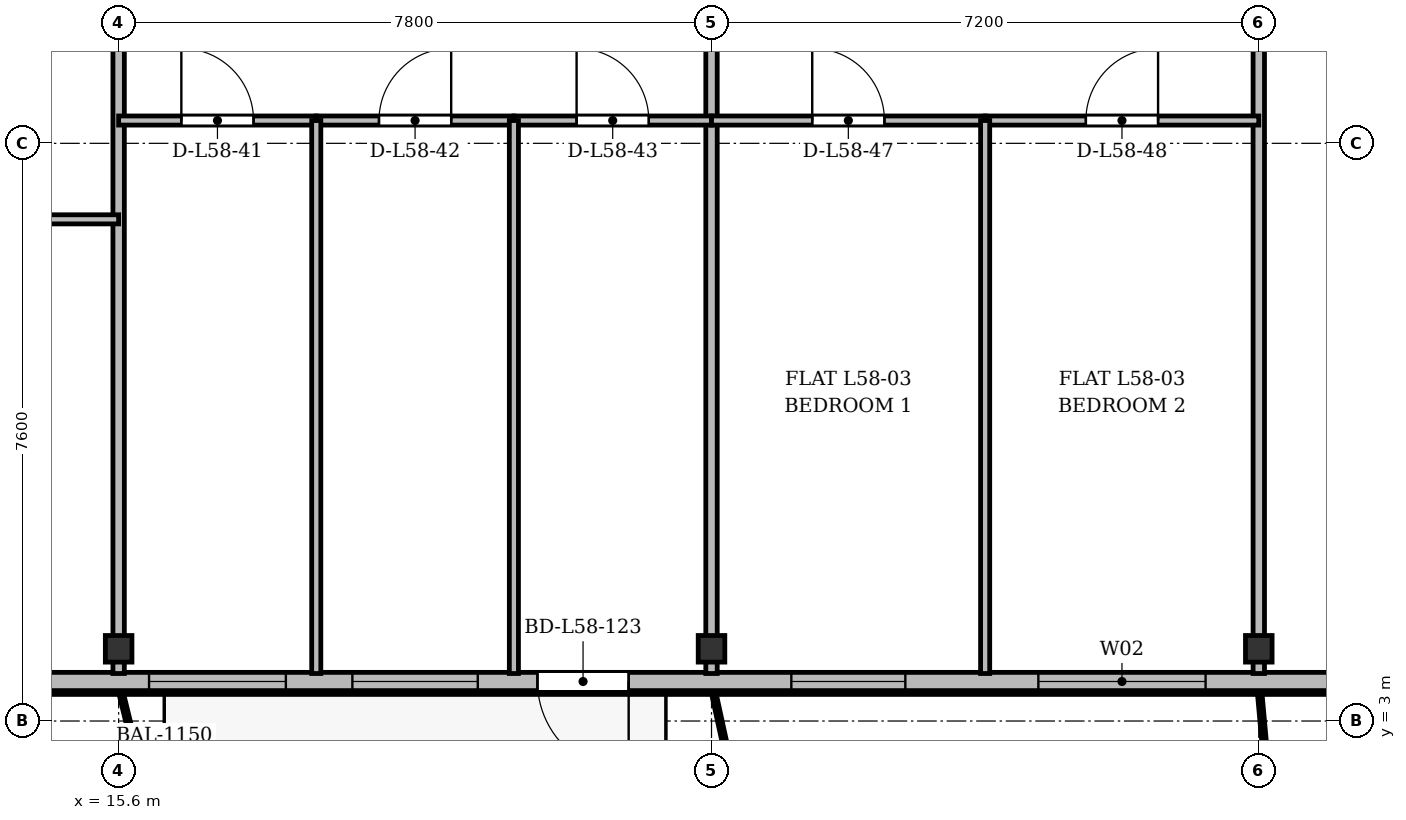
"""IFC4 building model, lengths in metres.
Left out: names, types, materials, properties, quantities, classifications, styles, units other than length and angle.
Written with IfcOpenShell. Run it as: python <this file> out.ifc"""

import sys

from ifc_helpers import new_model, si_unit, direction, frame, frame_2d, origin, origin_2d, place, context, subcontext, project, spatial, rectangle, i_section, extrude, source, transform, mapped, element, fill, save


model = new_model("IFC4")
c1 = context("Model", 3, precision=1e-05, world=origin(), true_north=direction((0.0, 1.0)))
c2 = subcontext(c1, "Body", "Model", "MODEL_VIEW")
j1 = project(units=[si_unit("LENGTHUNIT", "METRE"), si_unit("PLANEANGLEUNIT", "RADIAN")], contexts=[c1])
p1 = place(None, origin())
s1 = spatial("IfcSite", under=j1, at=p1, CompositionType="ELEMENT")
p2 = place(p1, origin())
s2 = spatial("IfcBuilding", under=s1, at=p2, CompositionType="ELEMENT")
p3 = place(p2, frame((0.0, 0.0, 222.9)))
s3 = spatial("IfcBuildingStorey", under=s2, at=p3, CompositionType="ELEMENT", Elevation=222.9)
m1 = source(origin(), c2, "Body", "SweptSolid", [
    extrude(i_section(OverallWidth=0.35, OverallDepth=0.35, WebThickness=0.018, FlangeThickness=0.028, at=origin_2d()), origin(), (0.0, 0.0, 1.0), 3.6),
])
for number, where, z_axis, x_axis in (
    (1, (15.6, 3.95, 0.0), (0.0, 0.0, 1.0), (1.0, 0.0, 0.0)),
    (2, (23.4, 3.95, 0.0), (0.0, 0.0, 1.0), (1.0, 0.0, 0.0)),
    (3, (30.6, 3.95, 0.0), (0.0, 0.0, 1.0), (1.0, 0.0, 0.0)),
):
    element("IfcColumn", number, at=place(p3, frame(where, z_axis=z_axis, x_axis=x_axis)), inside=s3, PredefinedType="COLUMN", context=c2, shape_type="MappedRepresentation", body=[
        mapped(m1, transform((0.0, 0.0, 0.0), x_axis=(1.0, 0.0, 0.0), y_axis=(0.0, 1.0, 0.0), z_axis=(0.0, 0.0, 1.0), scale=1.0)),
    ])
p4 = place(p3, frame((63.4, 3.52, 0.0), z_axis=(0.0, 0.0, 1.0), x_axis=(-1.0, 0.0, 0.0)))
e4 = element("IfcWall", 4, at=p4, inside=s3, PredefinedType="SOLIDWALL", context=c2, shape_type="SweptSolid", body=[
    extrude(rectangle(XDim=52.4, YDim=0.24, at=frame_2d((26.2, 0.0))), origin(), (0.0, 0.0, 1.0), 3.36),
])
p5 = place(p4, frame((1.345, 0.0, 0.9)))
e5 = element("IfcOpeningElement", 5, at=p5, cuts=e4, PredefinedType="OPENING", context=c2, shape_type="SweptSolid", body=[
    extrude(rectangle(XDim=2.0, YDim=1.95, at=frame_2d((1.0, 0.975))), frame((0.0, 0.13, 0.0), z_axis=(0.0, -1.0, 0.0), x_axis=(1.0, 0.0, 0.0)), (0.0, 0.0, 1.0), 0.26),
])
p6 = place(p4, frame((7.675, 0.0, 0.9)))
e6 = element("IfcOpeningElement", 6, at=p6, cuts=e4, PredefinedType="OPENING", context=c2, shape_type="SweptSolid", body=[
    extrude(rectangle(XDim=1.65, YDim=1.85, at=frame_2d((0.825, 0.925))), frame((0.0, 0.13, 0.0), z_axis=(0.0, -1.0, 0.0), x_axis=(1.0, 0.0, 0.0)), (0.0, 0.0, 1.0), 0.26),
])
p7 = place(p4, frame((13.42, 0.0, 0.0)))
e7 = element("IfcOpeningElement", 7, at=p7, cuts=e4, PredefinedType="OPENING", context=c2, shape_type="SweptSolid", body=[
    extrude(rectangle(XDim=1.2, YDim=2.2, at=frame_2d((0.6, 1.1))), frame((0.0, 0.13, 0.0), z_axis=(0.0, -1.0, 0.0), x_axis=(1.0, 0.0, 0.0)), (0.0, 0.0, 1.0), 0.26),
])
p8 = place(p4, frame((15.25, 0.0, 0.9)))
e8 = element("IfcOpeningElement", 8, at=p8, cuts=e4, PredefinedType="OPENING", context=c2, shape_type="SweptSolid", body=[
    extrude(rectangle(XDim=1.5, YDim=1.75, at=frame_2d((0.75, 0.875))), frame((0.0, 0.13, 0.0), z_axis=(0.0, -1.0, 0.0), x_axis=(1.0, 0.0, 0.0)), (0.0, 0.0, 1.0), 0.26),
])
p9 = place(p4, frame((17.65, 0.0, 0.9)))
e9 = element("IfcOpeningElement", 9, at=p9, cuts=e4, PredefinedType="OPENING", context=c2, shape_type="SweptSolid", body=[
    extrude(rectangle(XDim=1.5, YDim=1.75, at=frame_2d((0.75, 0.875))), frame((0.0, 0.13, 0.0), z_axis=(0.0, -1.0, 0.0), x_axis=(1.0, 0.0, 0.0)), (0.0, 0.0, 1.0), 0.26),
])
p10 = place(p4, frame((20.25, 0.0, 0.9)))
e10 = element("IfcOpeningElement", 10, at=p10, cuts=e4, PredefinedType="OPENING", context=c2, shape_type="SweptSolid", body=[
    extrude(rectangle(XDim=2.0, YDim=1.95, at=frame_2d((1.0, 0.975))), frame((0.0, 0.13, 0.0), z_axis=(0.0, -1.0, 0.0), x_axis=(1.0, 0.0, 0.0)), (0.0, 0.0, 1.0), 0.26),
])
p11 = place(p4, frame((23.725, 0.0, 0.9)))
e11 = element("IfcOpeningElement", 11, at=p11, cuts=e4, PredefinedType="OPENING", context=c2, shape_type="SweptSolid", body=[
    extrude(rectangle(XDim=1.65, YDim=1.85, at=frame_2d((0.825, 0.925))), frame((0.0, 0.13, 0.0), z_axis=(0.0, -1.0, 0.0), x_axis=(1.0, 0.0, 0.0)), (0.0, 0.0, 1.0), 0.26),
])
p12 = place(p4, frame((28.6, 0.0, 0.9)))
e12 = element("IfcOpeningElement", 12, at=p12, cuts=e4, PredefinedType="OPENING", context=c2, shape_type="SweptSolid", body=[
    extrude(rectangle(XDim=1.8, YDim=1.8, at=frame_2d((0.9, 0.9))), frame((0.0, 0.13, 0.0), z_axis=(0.0, -1.0, 0.0), x_axis=(1.0, 0.0, 0.0)), (0.0, 0.0, 1.0), 0.26),
])
p13 = place(p4, frame((33.5, 0.0, 0.9)))
e13 = element("IfcOpeningElement", 13, at=p13, cuts=e4, PredefinedType="OPENING", context=c2, shape_type="SweptSolid", body=[
    extrude(rectangle(XDim=2.2, YDim=1.8, at=frame_2d((1.1, 0.9))), frame((0.0, 0.13, 0.0), z_axis=(0.0, -1.0, 0.0), x_axis=(1.0, 0.0, 0.0)), (0.0, 0.0, 1.0), 0.26),
])
p14 = place(p4, frame((37.45, 0.0, 0.9)))
e14 = element("IfcOpeningElement", 14, at=p14, cuts=e4, PredefinedType="OPENING", context=c2, shape_type="SweptSolid", body=[
    extrude(rectangle(XDim=1.5, YDim=1.75, at=frame_2d((0.75, 0.875))), frame((0.0, 0.13, 0.0), z_axis=(0.0, -1.0, 0.0), x_axis=(1.0, 0.0, 0.0)), (0.0, 0.0, 1.0), 0.26),
])
p15 = place(p4, frame((41.09, 0.0, 0.0)))
e15 = element("IfcOpeningElement", 15, at=p15, cuts=e4, PredefinedType="OPENING", context=c2, shape_type="SweptSolid", body=[
    extrude(rectangle(XDim=1.2, YDim=2.2, at=frame_2d((0.6, 1.1))), frame((0.0, 0.13, 0.0), z_axis=(0.0, -1.0, 0.0), x_axis=(1.0, 0.0, 0.0)), (0.0, 0.0, 1.0), 0.26),
])
p16 = place(p4, frame((43.075, 0.0, 0.9)))
e16 = element("IfcOpeningElement", 16, at=p16, cuts=e4, PredefinedType="OPENING", context=c2, shape_type="SweptSolid", body=[
    extrude(rectangle(XDim=1.65, YDim=1.85, at=frame_2d((0.825, 0.925))), frame((0.0, 0.13, 0.0), z_axis=(0.0, -1.0, 0.0), x_axis=(1.0, 0.0, 0.0)), (0.0, 0.0, 1.0), 0.26),
])
p17 = place(p4, frame((45.6, 0.0, 0.9)))
e17 = element("IfcOpeningElement", 17, at=p17, cuts=e4, PredefinedType="OPENING", context=c2, shape_type="SweptSolid", body=[
    extrude(rectangle(XDim=1.8, YDim=1.8, at=frame_2d((0.9, 0.9))), frame((0.0, 0.13, 0.0), z_axis=(0.0, -1.0, 0.0), x_axis=(1.0, 0.0, 0.0)), (0.0, 0.0, 1.0), 0.26),
])
p18 = place(p4, frame((48.955, 0.0, 0.9)))
e18 = element("IfcOpeningElement", 18, at=p18, cuts=e4, PredefinedType="OPENING", context=c2, shape_type="SweptSolid", body=[
    extrude(rectangle(XDim=2.2, YDim=1.8, at=frame_2d((1.1, 0.9))), frame((0.0, 0.13, 0.0), z_axis=(0.0, -1.0, 0.0), x_axis=(1.0, 0.0, 0.0)), (0.0, 0.0, 1.0), 0.26),
])
for number, where, z_axis, x_axis in (
    (19, (15.6, 3.625, 0.0), (0.0, 0.0, 1.0), (0.0, 1.0, 0.0)),
    (20, (23.4, 3.625, 0.0), (0.0, 0.0, 1.0), (0.0, 1.0, 0.0)),
    (21, (30.6, 3.625, 0.0), (0.0, 0.0, 1.0), (0.0, 1.0, 0.0)),
):
    element("IfcWall", number, at=place(p3, frame(where, z_axis=z_axis, x_axis=x_axis)), inside=s3, PredefinedType="PARTITIONING", context=c2, shape_type="SweptSolid", body=[
        extrude(rectangle(XDim=27.375, YDim=0.15, at=frame_2d((13.688, 0.0))), origin(), (0.0, 0.0, 1.0), 2.86),
    ])
p19 = place(p3, frame((8.24, 9.6, 0.0), z_axis=(0.0, 0.0, 1.0), x_axis=(1.0, 0.0, 0.0)))
e22 = element("IfcWall", 22, at=p19, inside=s3, PredefinedType="PARTITIONING", context=c2, shape_type="SweptSolid", body=[
    extrude(rectangle(XDim=7.36, YDim=0.12, at=frame_2d((3.68, 0.0))), origin(), (0.0, 0.0, 1.0), 2.86),
])
p20 = place(p19, frame((3.114, 0.0, 0.0)))
e23 = element("IfcOpeningElement", 23, at=p20, cuts=e22, PredefinedType="OPENING", context=c2, shape_type="SweptSolid", body=[
    extrude(rectangle(XDim=0.95, YDim=2.15, at=frame_2d((0.475, 1.075))), frame((0.0, 0.07, 0.0), z_axis=(0.0, -1.0, 0.0), x_axis=(1.0, 0.0, 0.0)), (0.0, 0.0, 1.0), 0.14),
])
p21 = place(p3, frame((15.6, 10.9, 0.0), z_axis=(0.0, 0.0, 1.0), x_axis=(1.0, 0.0, 0.0)))
e24 = element("IfcWall", 24, at=p21, inside=s3, PredefinedType="PARTITIONING", context=c2, shape_type="SweptSolid", body=[
    extrude(rectangle(XDim=2.6, YDim=0.12, at=frame_2d((1.3, 0.0))), origin(), (0.0, 0.0, 1.0), 2.86),
])
p22 = place(p21, frame((0.825, 0.0, 0.0)))
e25 = element("IfcOpeningElement", 25, at=p22, cuts=e24, PredefinedType="OPENING", context=c2, shape_type="SweptSolid", body=[
    extrude(rectangle(XDim=0.95, YDim=2.15, at=frame_2d((0.475, 1.075))), frame((0.0, 0.07, 0.0), z_axis=(0.0, -1.0, 0.0), x_axis=(1.0, 0.0, 0.0)), (0.0, 0.0, 1.0), 0.14),
])
p23 = place(p3, frame((18.2, 10.9, 0.0), z_axis=(0.0, 0.0, 1.0), x_axis=(1.0, 0.0, 0.0)))
e26 = element("IfcWall", 26, at=p23, inside=s3, PredefinedType="PARTITIONING", context=c2, shape_type="SweptSolid", body=[
    extrude(rectangle(XDim=2.6, YDim=0.12, at=frame_2d((1.3, 0.0))), origin(), (0.0, 0.0, 1.0), 3.06),
])
p24 = place(p23, frame((0.825, 0.0, 0.0)))
e27 = element("IfcOpeningElement", 27, at=p24, cuts=e26, PredefinedType="OPENING", context=c2, shape_type="SweptSolid", body=[
    extrude(rectangle(XDim=0.95, YDim=2.15, at=frame_2d((0.475, 1.075))), frame((0.0, 0.07, 0.0), z_axis=(0.0, -1.0, 0.0), x_axis=(1.0, 0.0, 0.0)), (0.0, 0.0, 1.0), 0.14),
])
p25 = place(p3, frame((18.2, 3.625, 0.0), z_axis=(0.0, 0.0, 1.0), x_axis=(0.0, 1.0, 0.0)))
e28 = element("IfcWall", 28, at=p25, inside=s3, PredefinedType="PARTITIONING", context=c2, shape_type="SweptSolid", body=[
    extrude(rectangle(XDim=7.275, YDim=0.12, at=frame_2d((3.637, 0.0))), origin(), (0.0, 0.0, 1.0), 2.91),
])
p26 = place(p3, frame((20.8, 10.9, 0.0), z_axis=(0.0, 0.0, 1.0), x_axis=(1.0, 0.0, 0.0)))
e29 = element("IfcWall", 29, at=p26, inside=s3, PredefinedType="PARTITIONING", context=c2, shape_type="SweptSolid", body=[
    extrude(rectangle(XDim=2.6, YDim=0.12, at=frame_2d((1.3, 0.0))), origin(), (0.0, 0.0, 1.0), 2.86),
])
p27 = place(p26, frame((0.825, 0.0, 0.0)))
e30 = element("IfcOpeningElement", 30, at=p27, cuts=e29, PredefinedType="OPENING", context=c2, shape_type="SweptSolid", body=[
    extrude(rectangle(XDim=0.95, YDim=2.15, at=frame_2d((0.475, 1.075))), frame((0.0, 0.07, 0.0), z_axis=(0.0, -1.0, 0.0), x_axis=(1.0, 0.0, 0.0)), (0.0, 0.0, 1.0), 0.14),
])
p28 = place(p3, frame((20.8, 3.625, 0.0), z_axis=(0.0, 0.0, 1.0), x_axis=(0.0, 1.0, 0.0)))
e31 = element("IfcWall", 31, at=p28, inside=s3, PredefinedType="PARTITIONING", context=c2, shape_type="SweptSolid", body=[
    extrude(rectangle(XDim=7.275, YDim=0.12, at=frame_2d((3.637, 0.0))), origin(), (0.0, 0.0, 1.0), 2.91),
])
p29 = place(p3, frame((23.4, 10.9, 0.0), z_axis=(0.0, 0.0, 1.0), x_axis=(1.0, 0.0, 0.0)))
e32 = element("IfcWall", 32, at=p29, inside=s3, PredefinedType="PARTITIONING", context=c2, shape_type="SweptSolid", body=[
    extrude(rectangle(XDim=3.6, YDim=0.12, at=frame_2d((1.8, 0.0))), origin(), (0.0, 0.0, 1.0), 2.86),
])
p30 = place(p29, frame((1.325, 0.0, 0.0)))
e33 = element("IfcOpeningElement", 33, at=p30, cuts=e32, PredefinedType="OPENING", context=c2, shape_type="SweptSolid", body=[
    extrude(rectangle(XDim=0.95, YDim=2.15, at=frame_2d((0.475, 1.075))), frame((0.0, 0.07, 0.0), z_axis=(0.0, -1.0, 0.0), x_axis=(1.0, 0.0, 0.0)), (0.0, 0.0, 1.0), 0.14),
])
p31 = place(p3, frame((27.0, 10.9, 0.0), z_axis=(0.0, 0.0, 1.0), x_axis=(1.0, 0.0, 0.0)))
e34 = element("IfcWall", 34, at=p31, inside=s3, PredefinedType="PARTITIONING", context=c2, shape_type="SweptSolid", body=[
    extrude(rectangle(XDim=3.6, YDim=0.12, at=frame_2d((1.8, 0.0))), origin(), (0.0, 0.0, 1.0), 2.86),
])
p32 = place(p31, frame((1.325, 0.0, 0.0)))
e35 = element("IfcOpeningElement", 35, at=p32, cuts=e34, PredefinedType="OPENING", context=c2, shape_type="SweptSolid", body=[
    extrude(rectangle(XDim=0.95, YDim=2.15, at=frame_2d((0.475, 1.075))), frame((0.0, 0.07, 0.0), z_axis=(0.0, -1.0, 0.0), x_axis=(1.0, 0.0, 0.0)), (0.0, 0.0, 1.0), 0.14),
])
p33 = place(p3, frame((27.0, 3.625, 0.0), z_axis=(0.0, 0.0, 1.0), x_axis=(0.0, 1.0, 0.0)))
e36 = element("IfcWall", 36, at=p33, inside=s3, PredefinedType="PARTITIONING", context=c2, shape_type="SweptSolid", body=[
    extrude(rectangle(XDim=7.275, YDim=0.12, at=frame_2d((3.637, 0.0))), origin(), (0.0, 0.0, 1.0), 2.91),
])
m2 = source(origin(), c2, "Body", "SweptSolid", [
    extrude(rectangle(XDim=2.2, YDim=1.8, at=frame_2d((1.1, 0.9))), frame((0.0, 0.03, 0.0), z_axis=(0.0, -1.0, 0.0), x_axis=(1.0, 0.0, 0.0)), (0.0, 0.0, 1.0), 0.06),
])
p34 = place(p13, origin())
e37 = element("IfcWindow", 37, at=p34, inside=s3, PartitioningType="SINGLE_PANEL", PredefinedType="WINDOW", context=c2, shape_type="MappedRepresentation", body=[
    mapped(m2, transform((0.0, 0.0, 0.0), x_axis=(1.0, 0.0, 0.0), y_axis=(0.0, 1.0, 0.0), z_axis=(0.0, 0.0, 1.0), scale=1.0)),
])
fill(e13, e37)
m3 = source(origin(), c2, "Body", "SweptSolid", [
    extrude(rectangle(XDim=1.5, YDim=1.75, at=frame_2d((0.75, 0.875))), frame((0.0, 0.03, 0.0), z_axis=(0.0, -1.0, 0.0), x_axis=(1.0, 0.0, 0.0)), (0.0, 0.0, 1.0), 0.06),
])
p35 = place(p14, origin())
e38 = element("IfcWindow", 38, at=p35, inside=s3, PartitioningType="SINGLE_PANEL", PredefinedType="WINDOW", context=c2, shape_type="MappedRepresentation", body=[
    mapped(m3, transform((0.0, 0.0, 0.0), x_axis=(1.0, 0.0, 0.0), y_axis=(0.0, 1.0, 0.0), z_axis=(0.0, 0.0, 1.0), scale=1.0)),
])
fill(e14, e38)
m4 = source(origin(), c2, "Body", "SweptSolid", [
    extrude(rectangle(XDim=1.2, YDim=2.2, at=frame_2d((0.6, 1.1))), frame((0.0, 0.025, 0.0), z_axis=(0.0, -1.0, 0.0), x_axis=(1.0, 0.0, 0.0)), (0.0, 0.0, 1.0), 0.05),
])
p36 = place(p15, origin())
e39 = element("IfcDoor", 39, at=p36, inside=s3, OperationType="SINGLE_SWING_LEFT", PredefinedType="DOOR", context=c2, shape_type="MappedRepresentation", body=[
    mapped(m4, transform((0.0, 0.0, 0.0), x_axis=(1.0, 0.0, 0.0), y_axis=(0.0, 1.0, 0.0), z_axis=(0.0, 0.0, 1.0), scale=1.0)),
])
fill(e15, e39)
m5 = source(origin(), c2, "Body", "SweptSolid", [
    extrude(rectangle(XDim=1.65, YDim=1.85, at=frame_2d((0.825, 0.925))), frame((0.0, 0.03, 0.0), z_axis=(0.0, -1.0, 0.0), x_axis=(1.0, 0.0, 0.0)), (0.0, 0.0, 1.0), 0.06),
])
p37 = place(p16, origin())
e40 = element("IfcWindow", 40, at=p37, inside=s3, PartitioningType="SINGLE_PANEL", PredefinedType="WINDOW", context=c2, shape_type="MappedRepresentation", body=[
    mapped(m5, transform((0.0, 0.0, 0.0), x_axis=(1.0, 0.0, 0.0), y_axis=(0.0, 1.0, 0.0), z_axis=(0.0, 0.0, 1.0), scale=1.0)),
])
fill(e16, e40)
m6 = source(origin(), c2, "Body", "SweptSolid", [
    extrude(rectangle(XDim=1.8, YDim=1.8, at=frame_2d((0.9, 0.9))), frame((0.0, 0.03, 0.0), z_axis=(0.0, -1.0, 0.0), x_axis=(1.0, 0.0, 0.0)), (0.0, 0.0, 1.0), 0.06),
])
p38 = place(p17, origin())
e41 = element("IfcWindow", 41, at=p38, inside=s3, PartitioningType="SINGLE_PANEL", PredefinedType="WINDOW", context=c2, shape_type="MappedRepresentation", body=[
    mapped(m6, transform((0.0, 0.0, 0.0), x_axis=(1.0, 0.0, 0.0), y_axis=(0.0, 1.0, 0.0), z_axis=(0.0, 0.0, 1.0), scale=1.0)),
])
fill(e17, e41)
m7 = source(origin(), c2, "Body", "SweptSolid", [
    extrude(rectangle(XDim=0.95, YDim=2.15, at=frame_2d((0.475, 1.075))), frame((0.0, 0.025, 0.0), z_axis=(0.0, -1.0, 0.0), x_axis=(1.0, 0.0, 0.0)), (0.0, 0.0, 1.0), 0.05),
])
p39 = place(p22, origin())
e42 = element("IfcDoor", 42, at=p39, inside=s3, OperationType="SINGLE_SWING_LEFT", PredefinedType="DOOR", context=c2, shape_type="MappedRepresentation", body=[
    mapped(m7, transform((0.0, 0.0, 0.0), x_axis=(1.0, 0.0, 0.0), y_axis=(0.0, 1.0, 0.0), z_axis=(0.0, 0.0, 1.0), scale=1.0)),
])
fill(e25, e42)
p40 = place(p24, origin())
e43 = element("IfcDoor", 43, at=p40, inside=s3, OperationType="SINGLE_SWING_RIGHT", PredefinedType="DOOR", context=c2, shape_type="MappedRepresentation", body=[
    mapped(m7, transform((0.0, 0.0, 0.0), x_axis=(1.0, 0.0, 0.0), y_axis=(0.0, 1.0, 0.0), z_axis=(0.0, 0.0, 1.0), scale=1.0)),
])
fill(e27, e43)
p41 = place(p27, origin())
e44 = element("IfcDoor", 44, at=p41, inside=s3, OperationType="SINGLE_SWING_LEFT", PredefinedType="DOOR", context=c2, shape_type="MappedRepresentation", body=[
    mapped(m7, transform((0.0, 0.0, 0.0), x_axis=(1.0, 0.0, 0.0), y_axis=(0.0, 1.0, 0.0), z_axis=(0.0, 0.0, 1.0), scale=1.0)),
])
fill(e30, e44)
p42 = place(p30, origin())
e45 = element("IfcDoor", 45, at=p42, inside=s3, OperationType="SINGLE_SWING_LEFT", PredefinedType="DOOR", context=c2, shape_type="MappedRepresentation", body=[
    mapped(m7, transform((0.0, 0.0, 0.0), x_axis=(1.0, 0.0, 0.0), y_axis=(0.0, 1.0, 0.0), z_axis=(0.0, 0.0, 1.0), scale=1.0)),
])
fill(e33, e45)
p43 = place(p32, origin())
e46 = element("IfcDoor", 46, at=p43, inside=s3, OperationType="SINGLE_SWING_RIGHT", PredefinedType="DOOR", context=c2, shape_type="MappedRepresentation", body=[
    mapped(m7, transform((0.0, 0.0, 0.0), x_axis=(1.0, 0.0, 0.0), y_axis=(0.0, 1.0, 0.0), z_axis=(0.0, 0.0, 1.0), scale=1.0)),
])
fill(e35, e46)
save(model, sys.argv[1])
